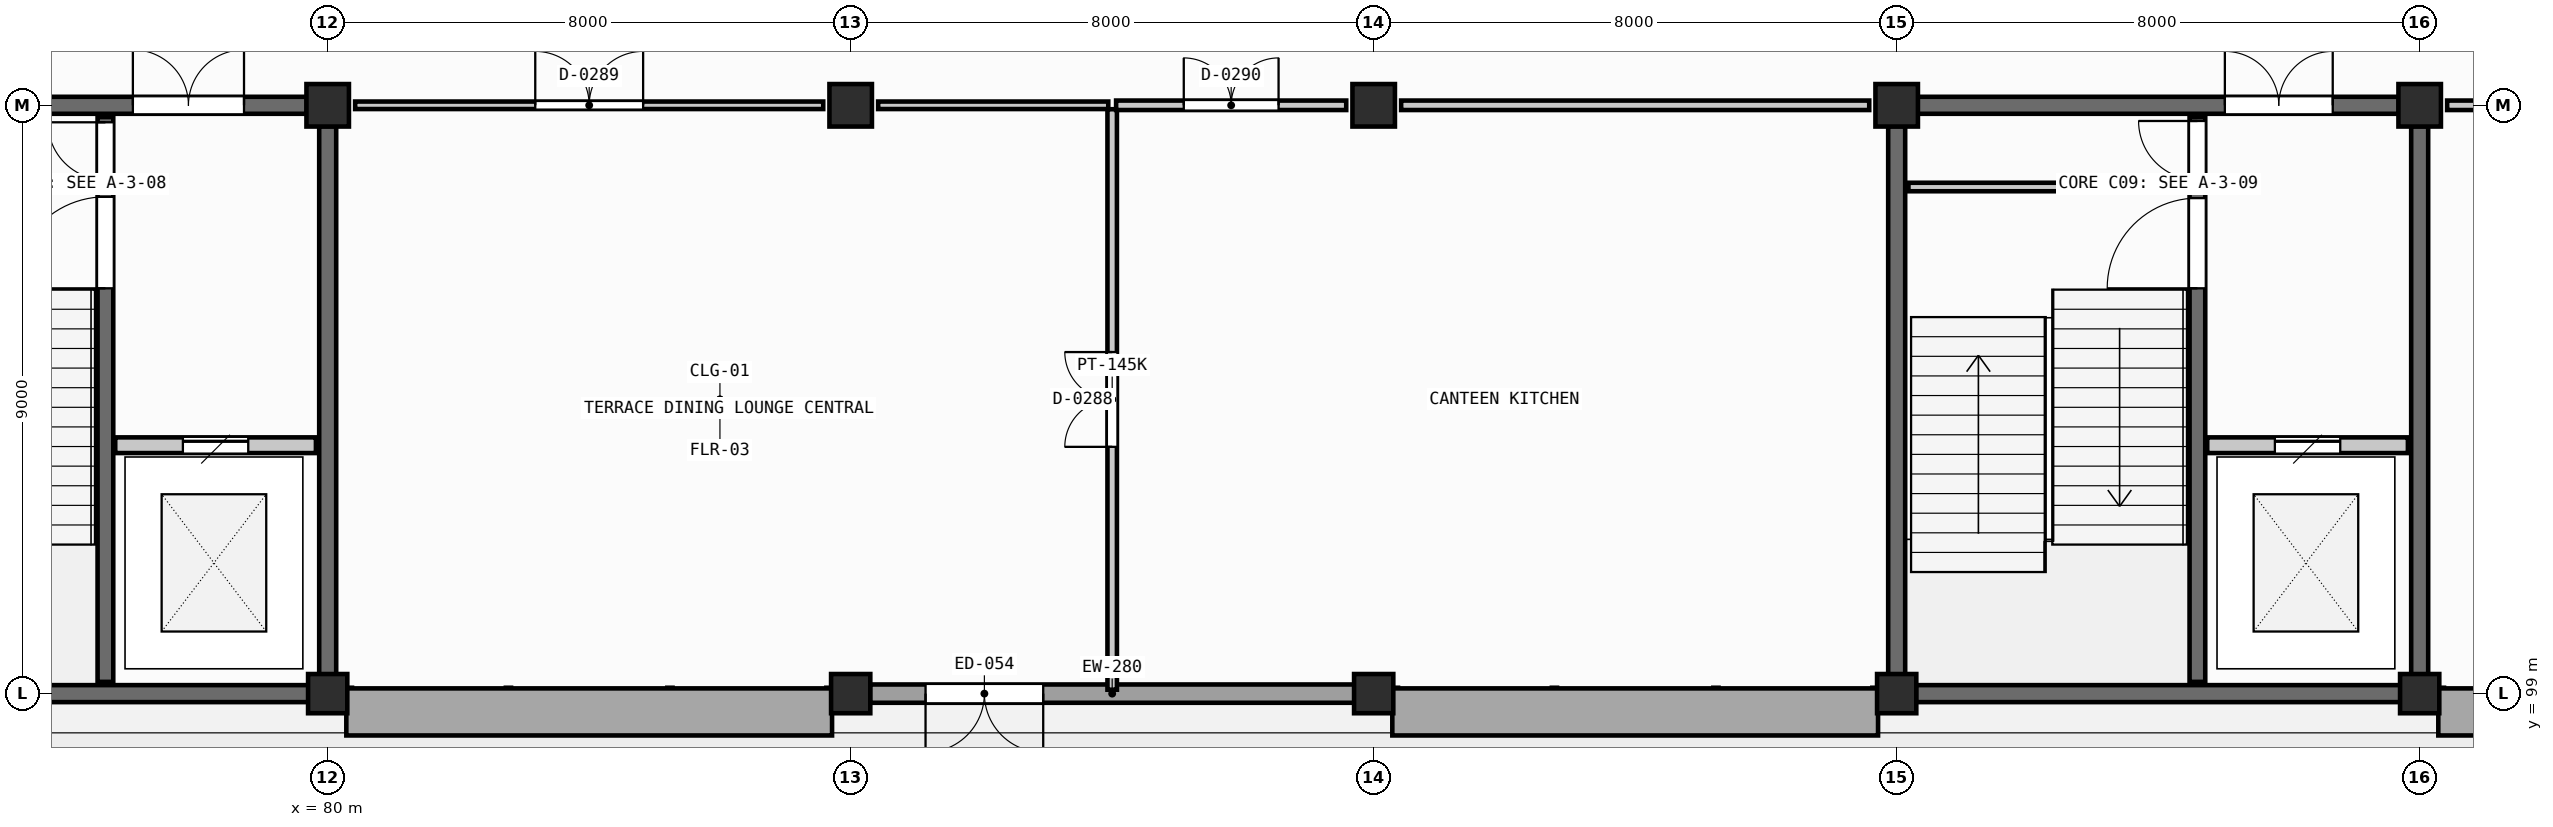
"""IFC4 building model, lengths in metres.
Left out: names, types, materials, properties, quantities, classifications, styles, units other than length and angle.
Written with IfcOpenShell. Run it as: python <this file> out.ifc"""

import sys

from ifc_helpers import new_model, si_unit, direction, frame, frame_2d, origin, origin_2d, place, context, subcontext, project, spatial, rectangle, extrude, element, fill, save


model = new_model("IFC4")
c1 = context("Model", 3, precision=1e-05, world=origin(), true_north=direction((0.0, 1.0)))
c2 = subcontext(c1, "Body", "Model", "MODEL_VIEW")
j1 = project(units=[si_unit("LENGTHUNIT", "METRE"), si_unit("PLANEANGLEUNIT", "RADIAN")], contexts=[c1])
p1 = place(None, origin())
s1 = spatial("IfcSite", under=j1, at=p1, CompositionType="ELEMENT")
p2 = place(p1, origin())
s2 = spatial("IfcBuilding", under=s1, at=p2, CompositionType="ELEMENT")
p3 = place(p2, frame((0.0, 0.0, 9.0)))
s3 = spatial("IfcBuildingStorey", under=s2, at=p3, CompositionType="ELEMENT", Elevation=9.0)
p4 = place(p3, frame((80.0, 99.0, 0.0), z_axis=(0.0, 0.0, 1.0), x_axis=(1.0, 0.0, 0.0)))
e1 = element("IfcColumn", 1, at=p4, inside=s3, PredefinedType="COLUMN", context=c2, shape_type="SweptSolid", body=[
    extrude(rectangle(XDim=0.6, YDim=0.6, at=origin_2d()), origin(), (0.0, 0.0, 1.0), 4.2),
])
p5 = place(p3, frame((80.0, 108.0, 0.0), z_axis=(0.0, 0.0, 1.0), x_axis=(1.0, 0.0, 0.0)))
e2 = element("IfcColumn", 2, at=p5, inside=s3, PredefinedType="COLUMN", context=c2, shape_type="SweptSolid", body=[
    extrude(rectangle(XDim=0.65, YDim=0.65, at=origin_2d()), origin(), (0.0, 0.0, 1.0), 4.2),
])
p6 = place(p3, frame((88.0, 99.0, 0.0), z_axis=(0.0, 0.0, 1.0), x_axis=(1.0, 0.0, 0.0)))
e3 = element("IfcColumn", 3, at=p6, inside=s3, PredefinedType="COLUMN", context=c2, shape_type="SweptSolid", body=[
    extrude(rectangle(XDim=0.6, YDim=0.6, at=origin_2d()), origin(), (0.0, 0.0, 1.0), 4.2),
])
p7 = place(p3, frame((88.0, 108.0, 0.0), z_axis=(0.0, 0.0, 1.0), x_axis=(1.0, 0.0, 0.0)))
e4 = element("IfcColumn", 4, at=p7, inside=s3, PredefinedType="COLUMN", context=c2, shape_type="SweptSolid", body=[
    extrude(rectangle(XDim=0.65, YDim=0.65, at=origin_2d()), origin(), (0.0, 0.0, 1.0), 4.2),
])
p8 = place(p3, frame((96.0, 99.0, 0.0), z_axis=(0.0, 0.0, 1.0), x_axis=(1.0, 0.0, 0.0)))
e5 = element("IfcColumn", 5, at=p8, inside=s3, PredefinedType="COLUMN", context=c2, shape_type="SweptSolid", body=[
    extrude(rectangle(XDim=0.6, YDim=0.6, at=origin_2d()), origin(), (0.0, 0.0, 1.0), 4.2),
])
p9 = place(p3, frame((96.0, 108.0, 0.0), z_axis=(0.0, 0.0, 1.0), x_axis=(1.0, 0.0, 0.0)))
e6 = element("IfcColumn", 6, at=p9, inside=s3, PredefinedType="COLUMN", context=c2, shape_type="SweptSolid", body=[
    extrude(rectangle(XDim=0.65, YDim=0.65, at=origin_2d()), origin(), (0.0, 0.0, 1.0), 4.2),
])
p10 = place(p3, frame((104.0, 99.0, 0.0), z_axis=(0.0, 0.0, 1.0), x_axis=(1.0, 0.0, 0.0)))
e7 = element("IfcColumn", 7, at=p10, inside=s3, PredefinedType="COLUMN", context=c2, shape_type="SweptSolid", body=[
    extrude(rectangle(XDim=0.6, YDim=0.6, at=origin_2d()), origin(), (0.0, 0.0, 1.0), 4.2),
])
p11 = place(p3, frame((104.0, 108.0, 0.0), z_axis=(0.0, 0.0, 1.0), x_axis=(1.0, 0.0, 0.0)))
e8 = element("IfcColumn", 8, at=p11, inside=s3, PredefinedType="COLUMN", context=c2, shape_type="SweptSolid", body=[
    extrude(rectangle(XDim=0.65, YDim=0.65, at=origin_2d()), origin(), (0.0, 0.0, 1.0), 4.2),
])
p12 = place(p3, frame((112.0, 99.0, 0.0), z_axis=(0.0, 0.0, 1.0), x_axis=(1.0, 0.0, 0.0)))
e9 = element("IfcColumn", 9, at=p12, inside=s3, PredefinedType="COLUMN", context=c2, shape_type="SweptSolid", body=[
    extrude(rectangle(XDim=0.6, YDim=0.6, at=origin_2d()), origin(), (0.0, 0.0, 1.0), 4.2),
])
p13 = place(p3, frame((112.0, 108.0, 0.0), z_axis=(0.0, 0.0, 1.0), x_axis=(1.0, 0.0, 0.0)))
e10 = element("IfcColumn", 10, at=p13, inside=s3, PredefinedType="COLUMN", context=c2, shape_type="SweptSolid", body=[
    extrude(rectangle(XDim=0.65, YDim=0.65, at=origin_2d()), origin(), (0.0, 0.0, 1.0), 4.2),
])
p14 = place(p3, frame((88.295, 99.0, 0.0), z_axis=(0.0, 0.0, 1.0), x_axis=(1.0, 0.0, 0.0)))
e11 = element("IfcWall", 11, at=p14, inside=s3, PredefinedType="SOLIDWALL", context=c2, shape_type="SweptSolid", body=[
    extrude(rectangle(XDim=7.41, YDim=0.28, at=frame_2d((3.705, 0.0))), origin(), (0.0, 0.0, 1.0), 3.05),
])
p15 = place(p14, frame((0.85, 0.0, 0.0)))
e12 = element("IfcOpeningElement", 12, at=p15, cuts=e11, PredefinedType="OPENING", context=c2, shape_type="SweptSolid", body=[
    extrude(rectangle(XDim=1.8, YDim=2.25, at=frame_2d((0.9, 1.125))), frame((0.0, 0.15, 0.0), z_axis=(0.0, -1.0, 0.0), x_axis=(1.0, 0.0, 0.0)), (0.0, 0.0, 1.0), 0.3),
])
p16 = place(p3, frame((72.295, 99.0, 0.0), z_axis=(0.0, 0.0, 1.0), x_axis=(1.0, 0.0, 0.0)))
e13 = element("IfcWall", 13, at=p16, inside=s3, PredefinedType="SHEAR", context=c2, shape_type="SweptSolid", body=[
    extrude(rectangle(XDim=7.41, YDim=0.26, at=frame_2d((3.705, 0.0))), origin(), (0.0, 0.0, 1.0), 3.955),
])
p17 = place(p3, frame((72.32, 108.0, 0.0), z_axis=(0.0, 0.0, 1.0), x_axis=(1.0, 0.0, 0.0)))
e14 = element("IfcWall", 14, at=p17, inside=s3, PredefinedType="SHEAR", context=c2, shape_type="SweptSolid", body=[
    extrude(rectangle(XDim=7.36, YDim=0.26, at=frame_2d((3.68, 0.0))), origin(), (0.0, 0.0, 1.0), 3.955),
])
p18 = place(p17, frame((4.7, 0.0, 0.0)))
e15 = element("IfcOpeningElement", 15, at=p18, cuts=e14, PredefinedType="OPENING", context=c2, shape_type="SweptSolid", body=[
    extrude(rectangle(XDim=1.7, YDim=2.25, at=frame_2d((0.85, 1.125))), frame((0.0, 0.14, 0.0), z_axis=(0.0, -1.0, 0.0), x_axis=(1.0, 0.0, 0.0)), (0.0, 0.0, 1.0), 0.28),
])
p19 = place(p3, frame((80.0, 99.295, 0.0), z_axis=(0.0, 0.0, 1.0), x_axis=(0.0, 1.0, 0.0)))
e16 = element("IfcWall", 16, at=p19, inside=s3, PredefinedType="SHEAR", context=c2, shape_type="SweptSolid", body=[
    extrude(rectangle(XDim=8.385, YDim=0.26, at=frame_2d((4.192, 0.0))), origin(), (0.0, 0.0, 1.0), 3.955),
])
p20 = place(p3, frame((76.6, 99.18, 0.0), z_axis=(0.0, 0.0, 1.0), x_axis=(0.0, 1.0, 0.0)))
e17 = element("IfcWall", 17, at=p20, inside=s3, PredefinedType="SHEAR", context=c2, shape_type="SweptSolid", body=[
    extrude(rectangle(XDim=8.64, YDim=0.24, at=frame_2d((4.32, 0.0))), origin(), (0.0, 0.0, 1.0), 3.955),
])
p21 = place(p20, frame((6.02, 0.0, 0.0)))
e18 = element("IfcOpeningElement", 18, at=p21, cuts=e17, PredefinedType="OPENING", context=c2, shape_type="SweptSolid", body=[
    extrude(rectangle(XDim=1.4, YDim=2.2, at=frame_2d((0.7, 1.1))), frame((0.0, 0.13, 0.0), z_axis=(0.0, -1.0, 0.0), x_axis=(1.0, 0.0, 0.0)), (0.0, 0.0, 1.0), 0.26),
])
p22 = place(p20, frame((7.68, 0.0, 0.0)))
e19 = element("IfcOpeningElement", 19, at=p22, cuts=e17, PredefinedType="OPENING", context=c2, shape_type="SweptSolid", body=[
    extrude(rectangle(XDim=0.88, YDim=2.02, at=frame_2d((0.44, 1.01))), frame((0.0, 0.13, 0.0), z_axis=(0.0, -1.0, 0.0), x_axis=(1.0, 0.0, 0.0)), (0.0, 0.0, 1.0), 0.26),
])
p23 = place(p3, frame((72.18, 106.75, 0.0), z_axis=(0.0, 0.0, 1.0), x_axis=(1.0, 0.0, 0.0)))
e20 = element("IfcWall", 20, at=p23, inside=s3, PredefinedType="PARTITIONING", context=c2, shape_type="SweptSolid", body=[
    extrude(rectangle(XDim=4.28, YDim=0.13, at=frame_2d((2.14, 0.0))), origin(), (0.0, 0.0, 1.0), 3.305),
])
p24 = place(p3, frame((76.75, 102.8, 0.0), z_axis=(0.0, 0.0, 1.0), x_axis=(1.0, 0.0, 0.0)))
e21 = element("IfcWall", 21, at=p24, inside=s3, PredefinedType="SHEAR", context=c2, shape_type="SweptSolid", body=[
    extrude(rectangle(XDim=3.07, YDim=0.24, at=frame_2d((1.535, 0.0))), origin(), (0.0, 0.0, 1.0), 3.305),
])
p25 = place(p24, frame((1.035, 0.0, 0.0)))
e22 = element("IfcOpeningElement", 22, at=p25, cuts=e21, PredefinedType="OPENING", context=c2, shape_type="SweptSolid", body=[
    extrude(rectangle(XDim=1.0, YDim=2.15, at=frame_2d((0.5, 1.075))), frame((0.0, 0.13, 0.0), z_axis=(0.0, -1.0, 0.0), x_axis=(1.0, 0.0, 0.0)), (0.0, 0.0, 1.0), 0.26),
])
p26 = place(p3, frame((104.295, 99.0, 0.0), z_axis=(0.0, 0.0, 1.0), x_axis=(1.0, 0.0, 0.0)))
e23 = element("IfcWall", 23, at=p26, inside=s3, PredefinedType="SHEAR", context=c2, shape_type="SweptSolid", body=[
    extrude(rectangle(XDim=7.41, YDim=0.26, at=frame_2d((3.705, 0.0))), origin(), (0.0, 0.0, 1.0), 3.955),
])
p27 = place(p3, frame((104.32, 108.0, 0.0), z_axis=(0.0, 0.0, 1.0), x_axis=(1.0, 0.0, 0.0)))
e24 = element("IfcWall", 24, at=p27, inside=s3, PredefinedType="SHEAR", context=c2, shape_type="SweptSolid", body=[
    extrude(rectangle(XDim=7.36, YDim=0.26, at=frame_2d((3.68, 0.0))), origin(), (0.0, 0.0, 1.0), 3.955),
])
p28 = place(p27, frame((4.7, 0.0, 0.0)))
e25 = element("IfcOpeningElement", 25, at=p28, cuts=e24, PredefinedType="OPENING", context=c2, shape_type="SweptSolid", body=[
    extrude(rectangle(XDim=1.65, YDim=2.22, at=frame_2d((0.825, 1.11))), frame((0.0, 0.14, 0.0), z_axis=(0.0, -1.0, 0.0), x_axis=(1.0, 0.0, 0.0)), (0.0, 0.0, 1.0), 0.28),
])
for number, where, z_axis, x_axis in (
    (26, (104.0, 99.295, 0.0), (0.0, 0.0, 1.0), (0.0, 1.0, 0.0)),
    (27, (112.0, 99.295, 0.0), (0.0, 0.0, 1.0), (0.0, 1.0, 0.0)),
):
    element("IfcWall", number, at=place(p3, frame(where, z_axis=z_axis, x_axis=x_axis)), inside=s3, PredefinedType="SHEAR", context=c2, shape_type="SweptSolid", body=[
        extrude(rectangle(XDim=8.385, YDim=0.26, at=frame_2d((4.192, 0.0))), origin(), (0.0, 0.0, 1.0), 3.955),
    ])
p29 = place(p3, frame((108.6, 99.18, 0.0), z_axis=(0.0, 0.0, 1.0), x_axis=(0.0, 1.0, 0.0)))
e28 = element("IfcWall", 28, at=p29, inside=s3, PredefinedType="SHEAR", context=c2, shape_type="SweptSolid", body=[
    extrude(rectangle(XDim=8.64, YDim=0.24, at=frame_2d((4.32, 0.0))), origin(), (0.0, 0.0, 1.0), 3.955),
])
p30 = place(p29, frame((6.02, 0.0, 0.0)))
e29 = element("IfcOpeningElement", 29, at=p30, cuts=e28, PredefinedType="OPENING", context=c2, shape_type="SweptSolid", body=[
    extrude(rectangle(XDim=1.38, YDim=2.22, at=frame_2d((0.69, 1.11))), frame((0.0, 0.13, 0.0), z_axis=(0.0, -1.0, 0.0), x_axis=(1.0, 0.0, 0.0)), (0.0, 0.0, 1.0), 0.26),
])
p31 = place(p29, frame((7.68, 0.0, 0.0)))
e30 = element("IfcOpeningElement", 30, at=p31, cuts=e28, PredefinedType="OPENING", context=c2, shape_type="SweptSolid", body=[
    extrude(rectangle(XDim=0.9, YDim=2.05, at=frame_2d((0.45, 1.025))), frame((0.0, 0.13, 0.0), z_axis=(0.0, -1.0, 0.0), x_axis=(1.0, 0.0, 0.0)), (0.0, 0.0, 1.0), 0.26),
])
p32 = place(p3, frame((104.18, 106.75, 0.0), z_axis=(0.0, 0.0, 1.0), x_axis=(1.0, 0.0, 0.0)))
e31 = element("IfcWall", 31, at=p32, inside=s3, PredefinedType="PARTITIONING", context=c2, shape_type="SweptSolid", body=[
    extrude(rectangle(XDim=4.28, YDim=0.13, at=frame_2d((2.14, 0.0))), origin(), (0.0, 0.0, 1.0), 3.305),
])
p33 = place(p3, frame((108.75, 102.8, 0.0), z_axis=(0.0, 0.0, 1.0), x_axis=(1.0, 0.0, 0.0)))
e32 = element("IfcWall", 32, at=p33, inside=s3, PredefinedType="SHEAR", context=c2, shape_type="SweptSolid", body=[
    extrude(rectangle(XDim=3.07, YDim=0.24, at=frame_2d((1.535, 0.0))), origin(), (0.0, 0.0, 1.0), 3.305),
])
p34 = place(p33, frame((1.035, 0.0, 0.0)))
e33 = element("IfcOpeningElement", 33, at=p34, cuts=e32, PredefinedType="OPENING", context=c2, shape_type="SweptSolid", body=[
    extrude(rectangle(XDim=1.0, YDim=2.15, at=frame_2d((0.5, 1.075))), frame((0.0, 0.13, 0.0), z_axis=(0.0, -1.0, 0.0), x_axis=(1.0, 0.0, 0.0)), (0.0, 0.0, 1.0), 0.26),
])
p35 = place(p3, frame((92.0, 99.06, 0.0), z_axis=(0.0, 0.0, 1.0), x_axis=(0.0, 1.0, 0.0)))
e34 = element("IfcWall", 34, at=p35, inside=s3, PredefinedType="PARTITIONING", context=c2, shape_type="SweptSolid", body=[
    extrude(rectangle(XDim=8.88, YDim=0.145, at=frame_2d((4.44, 0.0))), origin(), (0.0, 0.0, 1.0), 3.05),
])
p36 = place(p35, frame((3.715, 0.0, 0.0)))
e35 = element("IfcOpeningElement", 35, at=p36, cuts=e34, PredefinedType="OPENING", context=c2, shape_type="SweptSolid", body=[
    extrude(rectangle(XDim=1.45, YDim=2.2, at=frame_2d((0.725, 1.1))), frame((0.0, 0.083, 0.0), z_axis=(0.0, -1.0, 0.0), x_axis=(1.0, 0.0, 0.0)), (0.0, 0.0, 1.0), 0.165),
])
p37 = place(p3, frame((80.42, 108.0, 0.0), z_axis=(0.0, 0.0, 1.0), x_axis=(1.0, 0.0, 0.0)))
e36 = element("IfcWall", 36, at=p37, inside=s3, PredefinedType="PARTITIONING", context=c2, shape_type="SweptSolid", body=[
    extrude(rectangle(XDim=7.16, YDim=0.115, at=frame_2d((3.58, 0.0))), origin(), (0.0, 0.0, 1.0), 3.05),
])
p38 = place(p37, frame((2.755, 0.0, 0.0)))
e37 = element("IfcOpeningElement", 37, at=p38, cuts=e36, PredefinedType="OPENING", context=c2, shape_type="SweptSolid", body=[
    extrude(rectangle(XDim=1.65, YDim=2.25, at=frame_2d((0.825, 1.125))), frame((0.0, 0.067, 0.0), z_axis=(0.0, -1.0, 0.0), x_axis=(1.0, 0.0, 0.0)), (0.0, 0.0, 1.0), 0.135),
])
p39 = place(p3, frame((88.42, 108.0, 0.0), z_axis=(0.0, 0.0, 1.0), x_axis=(1.0, 0.0, 0.0)))
e38 = element("IfcWall", 38, at=p39, inside=s3, PredefinedType="PARTITIONING", context=c2, shape_type="SweptSolid", body=[
    extrude(rectangle(XDim=3.52, YDim=0.115, at=frame_2d((1.76, 0.0))), origin(), (0.0, 0.0, 1.0), 3.05),
])
p40 = place(p3, frame((92.06, 108.0, 0.0), z_axis=(0.0, 0.0, 1.0), x_axis=(1.0, 0.0, 0.0)))
e39 = element("IfcWall", 39, at=p40, inside=s3, PredefinedType="PARTITIONING", context=c2, shape_type="SweptSolid", body=[
    extrude(rectangle(XDim=3.52, YDim=0.145, at=frame_2d((1.76, 0.0))), origin(), (0.0, 0.0, 1.0), 3.05),
])
p41 = place(p40, frame((1.035, 0.0, 0.0)))
e40 = element("IfcOpeningElement", 40, at=p41, cuts=e39, PredefinedType="OPENING", context=c2, shape_type="SweptSolid", body=[
    extrude(rectangle(XDim=1.45, YDim=2.2, at=frame_2d((0.725, 1.1))), frame((0.0, 0.083, 0.0), z_axis=(0.0, -1.0, 0.0), x_axis=(1.0, 0.0, 0.0)), (0.0, 0.0, 1.0), 0.165),
])
p42 = place(p3, frame((96.42, 108.0, 0.0), z_axis=(0.0, 0.0, 1.0), x_axis=(1.0, 0.0, 0.0)))
e41 = element("IfcWall", 41, at=p42, inside=s3, PredefinedType="PARTITIONING", context=c2, shape_type="SweptSolid", body=[
    extrude(rectangle(XDim=7.16, YDim=0.145, at=frame_2d((3.58, 0.0))), origin(), (0.0, 0.0, 1.0), 3.05),
])
p43 = place(p3, frame((112.42, 108.0, 0.0), z_axis=(0.0, 0.0, 1.0), x_axis=(1.0, 0.0, 0.0)))
e42 = element("IfcWall", 42, at=p43, inside=s3, PredefinedType="PARTITIONING", context=c2, shape_type="SweptSolid", body=[
    extrude(rectangle(XDim=7.16, YDim=0.145, at=frame_2d((3.58, 0.0))), origin(), (0.0, 0.0, 1.0), 3.05),
])
p44 = place(p43, frame((2.93, 0.0, 0.0)))
e43 = element("IfcOpeningElement", 43, at=p44, cuts=e42, PredefinedType="OPENING", context=c2, shape_type="SweptSolid", body=[
    extrude(rectangle(XDim=1.3, YDim=2.15, at=frame_2d((0.65, 1.075))), frame((0.0, 0.083, 0.0), z_axis=(0.0, -1.0, 0.0), x_axis=(1.0, 0.0, 0.0)), (0.0, 0.0, 1.0), 0.165),
])
p45 = place(p15, frame((1.8, 0.0, 0.0), z_axis=(0.0, 0.0, 1.0), x_axis=(-1.0, 0.0, 0.0)))
e44 = element("IfcDoor", 44, at=p45, inside=s3, OperationType="DOUBLE_DOOR_SINGLE_SWING", PredefinedType="DOOR", context=c2, shape_type="SweptSolid", body=[
    extrude(rectangle(XDim=1.8, YDim=2.25, at=frame_2d((0.9, 1.125))), frame((0.0, 0.025, 0.0), z_axis=(0.0, -1.0, 0.0), x_axis=(1.0, 0.0, 0.0)), (0.0, 0.0, 1.0), 0.05),
])
fill(e12, e44)
p46 = place(p21, origin())
e45 = element("IfcDoor", 45, at=p46, inside=s3, OperationType="SINGLE_SWING_LEFT", PredefinedType="DOOR", context=c2, shape_type="SweptSolid", body=[
    extrude(rectangle(XDim=1.4, YDim=2.2, at=frame_2d((0.7, 1.1))), frame((0.0, 0.025, 0.0), z_axis=(0.0, -1.0, 0.0), x_axis=(1.0, 0.0, 0.0)), (0.0, 0.0, 1.0), 0.05),
])
fill(e18, e45)
p47 = place(p22, origin())
e46 = element("IfcDoor", 46, at=p47, inside=s3, OperationType="SINGLE_SWING_RIGHT", PredefinedType="DOOR", context=c2, shape_type="SweptSolid", body=[
    extrude(rectangle(XDim=0.88, YDim=2.02, at=frame_2d((0.44, 1.01))), frame((0.0, 0.025, 0.0), z_axis=(0.0, -1.0, 0.0), x_axis=(1.0, 0.0, 0.0)), (0.0, 0.0, 1.0), 0.05),
])
fill(e19, e46)
p48 = place(p18, origin())
e47 = element("IfcDoor", 47, at=p48, inside=s3, OperationType="DOUBLE_DOOR_SINGLE_SWING", PredefinedType="DOOR", context=c2, shape_type="SweptSolid", body=[
    extrude(rectangle(XDim=1.7, YDim=2.25, at=frame_2d((0.85, 1.125))), frame((0.0, 0.025, 0.0), z_axis=(0.0, -1.0, 0.0), x_axis=(1.0, 0.0, 0.0)), (0.0, 0.0, 1.0), 0.05),
])
fill(e15, e47)
p49 = place(p25, origin())
e48 = element("IfcDoor", 48, at=p49, inside=s3, OperationType="SLIDING_TO_LEFT", PredefinedType="DOOR", context=c2, shape_type="SweptSolid", body=[
    extrude(rectangle(XDim=1.0, YDim=2.15, at=frame_2d((0.5, 1.075))), frame((0.0, 0.025, 0.0), z_axis=(0.0, -1.0, 0.0), x_axis=(1.0, 0.0, 0.0)), (0.0, 0.0, 1.0), 0.05),
])
fill(e22, e48)
p50 = place(p30, origin())
e49 = element("IfcDoor", 49, at=p50, inside=s3, OperationType="SINGLE_SWING_LEFT", PredefinedType="DOOR", context=c2, shape_type="SweptSolid", body=[
    extrude(rectangle(XDim=1.38, YDim=2.22, at=frame_2d((0.69, 1.11))), frame((0.0, 0.025, 0.0), z_axis=(0.0, -1.0, 0.0), x_axis=(1.0, 0.0, 0.0)), (0.0, 0.0, 1.0), 0.05),
])
fill(e29, e49)
p51 = place(p31, origin())
e50 = element("IfcDoor", 50, at=p51, inside=s3, OperationType="SINGLE_SWING_RIGHT", PredefinedType="DOOR", context=c2, shape_type="SweptSolid", body=[
    extrude(rectangle(XDim=0.9, YDim=2.05, at=frame_2d((0.45, 1.025))), frame((0.0, 0.025, 0.0), z_axis=(0.0, -1.0, 0.0), x_axis=(1.0, 0.0, 0.0)), (0.0, 0.0, 1.0), 0.05),
])
fill(e30, e50)
p52 = place(p28, origin())
e51 = element("IfcDoor", 51, at=p52, inside=s3, OperationType="DOUBLE_DOOR_SINGLE_SWING", PredefinedType="DOOR", context=c2, shape_type="SweptSolid", body=[
    extrude(rectangle(XDim=1.65, YDim=2.22, at=frame_2d((0.825, 1.11))), frame((0.0, 0.025, 0.0), z_axis=(0.0, -1.0, 0.0), x_axis=(1.0, 0.0, 0.0)), (0.0, 0.0, 1.0), 0.05),
])
fill(e25, e51)
p53 = place(p34, origin())
e52 = element("IfcDoor", 52, at=p53, inside=s3, OperationType="SLIDING_TO_LEFT", PredefinedType="DOOR", context=c2, shape_type="SweptSolid", body=[
    extrude(rectangle(XDim=1.0, YDim=2.15, at=frame_2d((0.5, 1.075))), frame((0.0, 0.025, 0.0), z_axis=(0.0, -1.0, 0.0), x_axis=(1.0, 0.0, 0.0)), (0.0, 0.0, 1.0), 0.05),
])
fill(e33, e52)
p54 = place(p36, origin())
e53 = element("IfcDoor", 53, at=p54, inside=s3, OperationType="DOUBLE_DOOR_DOUBLE_SWING", PredefinedType="DOOR", context=c2, shape_type="SweptSolid", body=[
    extrude(rectangle(XDim=1.45, YDim=2.2, at=frame_2d((0.725, 1.1))), frame((0.0, 0.025, 0.0), z_axis=(0.0, -1.0, 0.0), x_axis=(1.0, 0.0, 0.0)), (0.0, 0.0, 1.0), 0.05),
])
fill(e35, e53)
p55 = place(p38, origin())
e54 = element("IfcDoor", 54, at=p55, inside=s3, OperationType="DOUBLE_DOOR_SINGLE_SWING", PredefinedType="DOOR", context=c2, shape_type="SweptSolid", body=[
    extrude(rectangle(XDim=1.65, YDim=2.25, at=frame_2d((0.825, 1.125))), frame((0.0, 0.025, 0.0), z_axis=(0.0, -1.0, 0.0), x_axis=(1.0, 0.0, 0.0)), (0.0, 0.0, 1.0), 0.05),
])
fill(e37, e54)
p56 = place(p41, origin())
e55 = element("IfcDoor", 55, at=p56, inside=s3, OperationType="DOUBLE_DOOR_DOUBLE_SWING", PredefinedType="DOOR", context=c2, shape_type="SweptSolid", body=[
    extrude(rectangle(XDim=1.45, YDim=2.2, at=frame_2d((0.725, 1.1))), frame((0.0, 0.025, 0.0), z_axis=(0.0, -1.0, 0.0), x_axis=(1.0, 0.0, 0.0)), (0.0, 0.0, 1.0), 0.05),
])
fill(e40, e55)
save(model, sys.argv[1])
